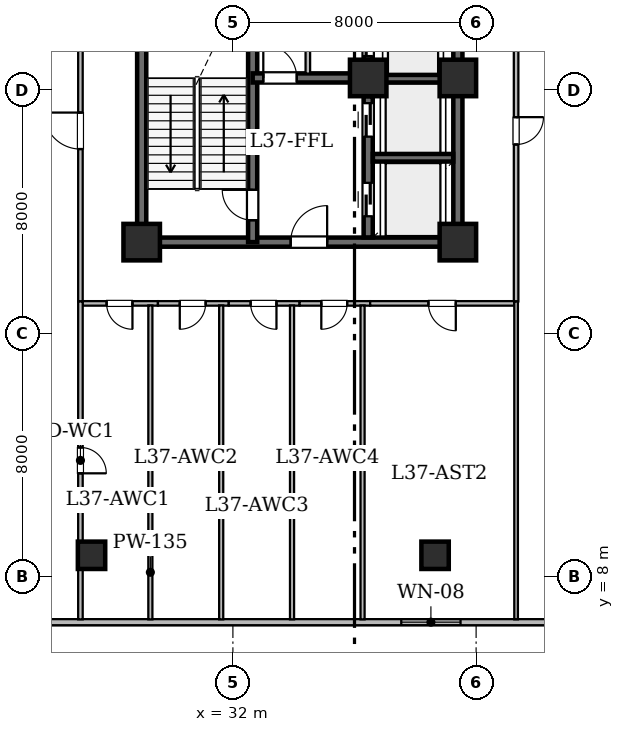
"""IFC4 building model, lengths in metres.
Left out: names, types, materials, properties, quantities, classifications, styles, units other than length and angle.
Written with IfcOpenShell. Run it as: python <this file> out.ifc"""

import sys

from ifc_helpers import new_model, si_unit, direction, frame, frame_2d, origin, origin_2d, place, context, subcontext, project, spatial, rectangle, hollow_rectangle, extrude, element, fill, save


model = new_model("IFC4")
c1 = context("Model", 3, precision=1e-05, world=origin(), true_north=direction((0.0, 1.0)))
c2 = subcontext(c1, "Body", "Model", "MODEL_VIEW")
j1 = project(units=[si_unit("LENGTHUNIT", "METRE"), si_unit("PLANEANGLEUNIT", "RADIAN")], contexts=[c1])
p1 = place(None, origin())
s1 = spatial("IfcSite", under=j1, at=p1, CompositionType="ELEMENT")
p2 = place(p1, origin())
s2 = spatial("IfcBuilding", under=s1, at=p2, CompositionType="ELEMENT")
p3 = place(p2, frame((0.0, 0.0, 145.7)))
s3 = spatial("IfcBuildingStorey", under=s2, at=p3, CompositionType="ELEMENT", Elevation=145.7)
for number, where, z_axis, x_axis in (
    (1, (29.0, 19.0, 0.0), (0.0, 0.0, 1.0), (1.0, 0.0, 0.0)),
    (2, (39.4, 19.0, 0.0), (0.0, 0.0, 1.0), (1.0, 0.0, 0.0)),
    (3, (36.45, 24.4, 0.0), (0.0, 0.0, 1.0), (1.0, 0.0, 0.0)),
    (4, (39.4, 24.4, 0.0), (0.0, 0.0, 1.0), (1.0, 0.0, 0.0)),
):
    element("IfcColumn", number, at=place(p3, frame(where, z_axis=z_axis, x_axis=x_axis)), inside=s3, PredefinedType="COLUMN", context=c2, shape_type="SweptSolid", body=[
        extrude(hollow_rectangle(XDim=1.2, YDim=1.2, WallThickness=0.06, at=origin_2d()), origin(), (0.0, 0.0, 1.0), 4.8),
    ])
for number, where, z_axis, x_axis in (
    (5, (27.35, 8.7, 0.0), (0.0, 0.0, 1.0), (1.0, 0.0, 0.0)),
    (6, (38.65, 8.7, 0.0), (0.0, 0.0, 1.0), (1.0, 0.0, 0.0)),
):
    element("IfcColumn", number, at=place(p3, frame(where, z_axis=z_axis, x_axis=x_axis)), inside=s3, PredefinedType="COLUMN", context=c2, shape_type="SweptSolid", body=[
        extrude(hollow_rectangle(XDim=0.9, YDim=0.9, WallThickness=0.045, at=origin_2d()), origin(), (0.0, 0.0, 1.0), 4.8),
    ])
p4 = place(p3, frame((52.296, 6.5, 0.0), z_axis=(0.0, 0.0, 1.0), x_axis=(-1.0, 0.0, 0.0)))
e7 = element("IfcWall", 7, at=p4, inside=s3, PredefinedType="STANDARD", context=c2, shape_type="SweptSolid", body=[
    extrude(rectangle(XDim=38.593, YDim=0.2, at=frame_2d((19.296, 0.0))), origin(), (0.0, 0.0, 1.0), 4.48),
])
p5 = place(p4, frame((12.808, 0.0, 0.9)))
e8 = element("IfcOpeningElement", 8, at=p5, cuts=e7, PredefinedType="OPENING", context=c2, shape_type="SweptSolid", body=[
    extrude(rectangle(XDim=1.95, YDim=1.65, at=frame_2d((0.975, 0.825))), frame((0.0, 0.11, 0.0), z_axis=(0.0, -1.0, 0.0), x_axis=(1.0, 0.0, 0.0)), (0.0, 0.0, 1.0), 0.22),
])
p6 = place(p3, frame((29.0, 19.0, 0.0), z_axis=(0.0, 0.0, 1.0), x_axis=(0.0, 1.0, 0.0)))
e9 = element("IfcWall", 9, at=p6, inside=s3, PredefinedType="SHEAR", context=c2, shape_type="SweptSolid", body=[
    extrude(rectangle(XDim=9.0, YDim=0.3, at=frame_2d((4.5, 0.0))), origin(), (0.0, 0.0, 1.0), 4.48),
])
p7 = place(p3, frame((29.0, 19.0, 0.0), z_axis=(0.0, 0.0, 1.0), x_axis=(1.0, 0.0, 0.0)))
e10 = element("IfcWall", 10, at=p7, inside=s3, PredefinedType="SHEAR", context=c2, shape_type="SweptSolid", body=[
    extrude(rectangle(XDim=10.4, YDim=0.3, at=frame_2d((5.2, 0.0))), origin(), (0.0, 0.0, 1.0), 4.48),
])
p8 = place(p7, frame((4.9, 0.0, 0.0)))
e11 = element("IfcOpeningElement", 11, at=p8, cuts=e10, PredefinedType="OPENING", context=c2, shape_type="SweptSolid", body=[
    extrude(rectangle(XDim=1.2, YDim=2.15, at=frame_2d((0.6, 1.075))), frame((0.0, 0.16, 0.0), z_axis=(0.0, -1.0, 0.0), x_axis=(1.0, 0.0, 0.0)), (0.0, 0.0, 1.0), 0.32),
])
p9 = place(p3, frame((39.4, 19.0, 0.0), z_axis=(0.0, 0.0, 1.0), x_axis=(0.0, 1.0, 0.0)))
e12 = element("IfcWall", 12, at=p9, inside=s3, PredefinedType="SHEAR", context=c2, shape_type="SweptSolid", body=[
    extrude(rectangle(XDim=5.4, YDim=0.3, at=frame_2d((2.7, 0.0))), origin(), (0.0, 0.0, 1.0), 4.48),
])
p10 = place(p3, frame((39.4, 24.4, 0.0), z_axis=(0.0, 0.0, 1.0), x_axis=(0.0, 1.0, 0.0)))
e13 = element("IfcWall", 13, at=p10, inside=s3, PredefinedType="SHEAR", context=c2, shape_type="SweptSolid", body=[
    extrude(rectangle(XDim=12.6, YDim=0.3, at=frame_2d((6.3, 0.0))), origin(), (0.0, 0.0, 1.0), 4.48),
])
p11 = place(p3, frame((32.65, 19.0, 0.0), z_axis=(0.0, 0.0, 1.0), x_axis=(0.0, 1.0, 0.0)))
e14 = element("IfcWall", 14, at=p11, inside=s3, PredefinedType="SHEAR", context=c2, shape_type="SweptSolid", body=[
    extrude(rectangle(XDim=9.0, YDim=0.3, at=frame_2d((4.5, 0.0))), origin(), (0.0, 0.0, 1.0), 4.48),
])
p12 = place(p11, frame((0.72, 0.0, 0.0)))
e15 = element("IfcOpeningElement", 15, at=p12, cuts=e14, PredefinedType="OPENING", context=c2, shape_type="SweptSolid", body=[
    extrude(rectangle(XDim=1.0, YDim=2.15, at=frame_2d((0.5, 1.075))), frame((0.0, 0.16, 0.0), z_axis=(0.0, -1.0, 0.0), x_axis=(1.0, 0.0, 0.0)), (0.0, 0.0, 1.0), 0.32),
])
p13 = place(p3, frame((32.65, 24.4, 0.0), z_axis=(0.0, 0.0, 1.0), x_axis=(1.0, 0.0, 0.0)))
e16 = element("IfcWall", 16, at=p13, inside=s3, PredefinedType="SHEAR", context=c2, shape_type="SweptSolid", body=[
    extrude(rectangle(XDim=3.8, YDim=0.3, at=frame_2d((1.9, 0.0))), origin(), (0.0, 0.0, 1.0), 4.48),
])
p14 = place(p13, frame((0.35, 0.0, 0.0)))
e17 = element("IfcOpeningElement", 17, at=p14, cuts=e16, PredefinedType="OPENING", context=c2, shape_type="SweptSolid", body=[
    extrude(rectangle(XDim=1.1, YDim=2.15, at=frame_2d((0.55, 1.075))), frame((0.0, 0.16, 0.0), z_axis=(0.0, -1.0, 0.0), x_axis=(1.0, 0.0, 0.0)), (0.0, 0.0, 1.0), 0.32),
])
p15 = place(p3, frame((36.45, 19.154, 0.0), z_axis=(0.0, 0.0, 1.0), x_axis=(0.0, 1.0, 0.0)))
e18 = element("IfcWall", 18, at=p15, inside=s3, PredefinedType="SHEAR", context=c2, shape_type="SweptSolid", body=[
    extrude(rectangle(XDim=4.646, YDim=0.3, at=frame_2d((2.323, 0.0))), origin(), (0.0, 0.0, 1.0), 4.48),
])
p16 = place(p15, frame((0.696, 0.0, 0.0)))
e19 = element("IfcOpeningElement", 19, at=p16, cuts=e18, PredefinedType="OPENING", context=c2, shape_type="SweptSolid", body=[
    extrude(rectangle(XDim=1.1, YDim=2.15, at=frame_2d((0.55, 1.075))), frame((0.0, 0.16, 0.0), z_axis=(0.0, -1.0, 0.0), x_axis=(1.0, 0.0, 0.0)), (0.0, 0.0, 1.0), 0.32),
])
p17 = place(p15, frame((3.316, 0.0, 0.0)))
e20 = element("IfcOpeningElement", 20, at=p17, cuts=e18, PredefinedType="OPENING", context=c2, shape_type="SweptSolid", body=[
    extrude(rectangle(XDim=1.1, YDim=2.15, at=frame_2d((0.55, 1.075))), frame((0.0, 0.16, 0.0), z_axis=(0.0, -1.0, 0.0), x_axis=(1.0, 0.0, 0.0)), (0.0, 0.0, 1.0), 0.32),
])
p18 = place(p3, frame((36.45, 25.0, 0.0), z_axis=(0.0, 0.0, 1.0), x_axis=(0.0, 1.0, 0.0)))
e21 = element("IfcWall", 21, at=p18, inside=s3, PredefinedType="SHEAR", context=c2, shape_type="SweptSolid", body=[
    extrude(rectangle(XDim=5.15, YDim=0.3, at=frame_2d((2.575, 0.0))), origin(), (0.0, 0.0, 1.0), 4.48),
])
p19 = place(p18, frame((0.12, 0.0, 0.0)))
e22 = element("IfcOpeningElement", 22, at=p19, cuts=e21, PredefinedType="OPENING", context=c2, shape_type="SweptSolid", body=[
    extrude(rectangle(XDim=1.05, YDim=2.15, at=frame_2d((0.525, 1.075))), frame((0.0, 0.16, 0.0), z_axis=(0.0, -1.0, 0.0), x_axis=(1.0, 0.0, 0.0)), (0.0, 0.0, 1.0), 0.32),
])
p20 = place(p18, frame((2.095, 0.0, 0.0)))
e23 = element("IfcOpeningElement", 23, at=p20, cuts=e21, PredefinedType="OPENING", context=c2, shape_type="SweptSolid", body=[
    extrude(rectangle(XDim=1.05, YDim=2.15, at=frame_2d((0.525, 1.075))), frame((0.0, 0.16, 0.0), z_axis=(0.0, -1.0, 0.0), x_axis=(1.0, 0.0, 0.0)), (0.0, 0.0, 1.0), 0.32),
])
p21 = place(p18, frame((3.98, 0.0, 0.0)))
e24 = element("IfcOpeningElement", 24, at=p21, cuts=e21, PredefinedType="OPENING", context=c2, shape_type="SweptSolid", body=[
    extrude(rectangle(XDim=1.05, YDim=2.15, at=frame_2d((0.525, 1.075))), frame((0.0, 0.16, 0.0), z_axis=(0.0, -1.0, 0.0), x_axis=(1.0, 0.0, 0.0)), (0.0, 0.0, 1.0), 0.32),
])
for number, where, z_axis, x_axis in (
    (25, (36.604, 21.775, 0.0), (0.0, 0.0, 1.0), (1.0, 0.0, 0.0)),
    (26, (36.604, 24.375, 0.0), (0.0, 0.0, 1.0), (1.0, 0.0, 0.0)),
):
    element("IfcWall", number, at=place(p3, frame(where, z_axis=z_axis, x_axis=x_axis)), inside=s3, PredefinedType="SHEAR", context=c2, shape_type="SweptSolid", body=[
        extrude(rectangle(XDim=2.642, YDim=0.25, at=frame_2d((1.321, 0.0))), origin(), (0.0, 0.0, 1.0), 4.48),
    ])
p22 = place(p3, frame((34.465, 27.55, 0.0), z_axis=(0.0, 0.0, 1.0), x_axis=(0.0, -1.0, 0.0)))
e27 = element("IfcWall", 27, at=p22, inside=s3, PredefinedType="STANDARD", context=c2, shape_type="SweptSolid", body=[
    extrude(rectangle(XDim=3.006, YDim=0.15, at=frame_2d((1.503, 0.0))), origin(), (0.0, 0.0, 1.0), 4.48),
])
p23 = place(p22, frame((1.053, 0.0, 0.0)))
e28 = element("IfcOpeningElement", 28, at=p23, cuts=e27, PredefinedType="OPENING", context=c2, shape_type="SweptSolid", body=[
    extrude(rectangle(XDim=0.9, YDim=2.1, at=frame_2d((0.45, 1.05))), frame((0.0, 0.085, 0.0), z_axis=(0.0, -1.0, 0.0), x_axis=(1.0, 0.0, 0.0)), (0.0, 0.0, 1.0), 0.17),
])
p24 = place(p3, frame((41.315, 28.314, 0.0), z_axis=(0.0, 0.0, 1.0), x_axis=(0.0, -1.0, 0.0)))
e29 = element("IfcWall", 29, at=p24, inside=s3, PredefinedType="STANDARD", context=c2, shape_type="SweptSolid", body=[
    extrude(rectangle(XDim=11.264, YDim=0.15, at=frame_2d((5.632, 0.0))), origin(), (0.0, 0.0, 1.0), 3.775),
])
p25 = place(p24, frame((5.203, 0.0, 0.0)))
e30 = element("IfcOpeningElement", 30, at=p25, cuts=e29, PredefinedType="OPENING", context=c2, shape_type="SweptSolid", body=[
    extrude(rectangle(XDim=0.9, YDim=2.1, at=frame_2d((0.45, 1.05))), frame((0.0, 0.085, 0.0), z_axis=(0.0, -1.0, 0.0), x_axis=(1.0, 0.0, 0.0)), (0.0, 0.0, 1.0), 0.17),
])
p26 = place(p3, frame((26.985, 17.05, 0.0), z_axis=(0.0, 0.0, 1.0), x_axis=(0.0, 1.0, 0.0)))
e31 = element("IfcWall", 31, at=p26, inside=s3, PredefinedType="STANDARD", context=c2, shape_type="SweptSolid", body=[
    extrude(rectangle(XDim=11.264, YDim=0.15, at=frame_2d((5.632, 0.0))), origin(), (0.0, 0.0, 1.0), 3.775),
])
p27 = place(p26, frame((5.011, 0.0, 0.0)))
e32 = element("IfcOpeningElement", 32, at=p27, cuts=e31, PredefinedType="OPENING", context=c2, shape_type="SweptSolid", body=[
    extrude(rectangle(XDim=1.2, YDim=2.15, at=frame_2d((0.6, 1.075))), frame((0.0, 0.085, 0.0), z_axis=(0.0, -1.0, 0.0), x_axis=(1.0, 0.0, 0.0)), (0.0, 0.0, 1.0), 0.17),
])
p28 = place(p3, frame((29.534, 16.985, 0.0), z_axis=(0.0, 0.0, 1.0), x_axis=(-1.0, 0.0, 0.0)))
e33 = element("IfcWall", 33, at=p28, inside=s3, PredefinedType="STANDARD", context=c2, shape_type="SweptSolid", body=[
    extrude(rectangle(XDim=2.484, YDim=0.15, at=frame_2d((1.242, 0.0))), origin(), (0.0, 0.0, 1.0), 3.775),
])
p29 = place(p28, frame((0.838, 0.0, 0.0)))
e34 = element("IfcOpeningElement", 34, at=p29, cuts=e33, PredefinedType="OPENING", context=c2, shape_type="SweptSolid", body=[
    extrude(rectangle(XDim=0.85, YDim=2.1, at=frame_2d((0.425, 1.05))), frame((0.0, 0.085, 0.0), z_axis=(0.0, -1.0, 0.0), x_axis=(1.0, 0.0, 0.0)), (0.0, 0.0, 1.0), 0.17),
])
p30 = place(p3, frame((31.864, 16.985, 0.0), z_axis=(0.0, 0.0, 1.0), x_axis=(-1.0, 0.0, 0.0)))
e35 = element("IfcWall", 35, at=p30, inside=s3, PredefinedType="STANDARD", context=c2, shape_type="SweptSolid", body=[
    extrude(rectangle(XDim=2.33, YDim=0.15, at=frame_2d((1.165, 0.0))), origin(), (0.0, 0.0, 1.0), 4.48),
])
p31 = place(p30, frame((0.761, 0.0, 0.0)))
e36 = element("IfcOpeningElement", 36, at=p31, cuts=e35, PredefinedType="OPENING", context=c2, shape_type="SweptSolid", body=[
    extrude(rectangle(XDim=0.85, YDim=2.1, at=frame_2d((0.425, 1.05))), frame((0.0, 0.085, 0.0), z_axis=(0.0, -1.0, 0.0), x_axis=(1.0, 0.0, 0.0)), (0.0, 0.0, 1.0), 0.17),
])
p32 = place(p3, frame((34.194, 16.985, 0.0), z_axis=(0.0, 0.0, 1.0), x_axis=(-1.0, 0.0, 0.0)))
e37 = element("IfcWall", 37, at=p32, inside=s3, PredefinedType="STANDARD", context=c2, shape_type="SweptSolid", body=[
    extrude(rectangle(XDim=2.33, YDim=0.15, at=frame_2d((1.165, 0.0))), origin(), (0.0, 0.0, 1.0), 4.48),
])
p33 = place(p32, frame((0.761, 0.0, 0.0)))
e38 = element("IfcOpeningElement", 38, at=p33, cuts=e37, PredefinedType="OPENING", context=c2, shape_type="SweptSolid", body=[
    extrude(rectangle(XDim=0.85, YDim=2.1, at=frame_2d((0.425, 1.05))), frame((0.0, 0.085, 0.0), z_axis=(0.0, -1.0, 0.0), x_axis=(1.0, 0.0, 0.0)), (0.0, 0.0, 1.0), 0.17),
])
p34 = place(p3, frame((36.514, 16.985, 0.0), z_axis=(0.0, 0.0, 1.0), x_axis=(-1.0, 0.0, 0.0)))
e39 = element("IfcWall", 39, at=p34, inside=s3, PredefinedType="STANDARD", context=c2, shape_type="SweptSolid", body=[
    extrude(rectangle(XDim=2.32, YDim=0.15, at=frame_2d((1.16, 0.0))), origin(), (0.0, 0.0, 1.0), 4.48),
])
p35 = place(p34, frame((0.756, 0.0, 0.0)))
e40 = element("IfcOpeningElement", 40, at=p35, cuts=e39, PredefinedType="OPENING", context=c2, shape_type="SweptSolid", body=[
    extrude(rectangle(XDim=0.85, YDim=2.1, at=frame_2d((0.425, 1.05))), frame((0.0, 0.085, 0.0), z_axis=(0.0, -1.0, 0.0), x_axis=(1.0, 0.0, 0.0)), (0.0, 0.0, 1.0), 0.17),
])
p36 = place(p3, frame((41.25, 16.985, 0.0), z_axis=(0.0, 0.0, 1.0), x_axis=(-1.0, 0.0, 0.0)))
e41 = element("IfcWall", 41, at=p36, inside=s3, PredefinedType="STANDARD", context=c2, shape_type="SweptSolid", body=[
    extrude(rectangle(XDim=4.736, YDim=0.15, at=frame_2d((2.368, 0.0))), origin(), (0.0, 0.0, 1.0), 3.775),
])
p37 = place(p36, frame((1.918, 0.0, 0.0)))
e42 = element("IfcOpeningElement", 42, at=p37, cuts=e41, PredefinedType="OPENING", context=c2, shape_type="SweptSolid", body=[
    extrude(rectangle(XDim=0.9, YDim=2.1, at=frame_2d((0.45, 1.05))), frame((0.0, 0.085, 0.0), z_axis=(0.0, -1.0, 0.0), x_axis=(1.0, 0.0, 0.0)), (0.0, 0.0, 1.0), 0.17),
])
p38 = place(p3, frame((41.315, 6.592, 0.0), z_axis=(0.0, 0.0, 1.0), x_axis=(0.0, 1.0, 0.0)))
e43 = element("IfcWall", 43, at=p38, inside=s3, PredefinedType="PARTITIONING", context=c2, shape_type="SweptSolid", body=[
    extrude(rectangle(XDim=10.458, YDim=0.12, at=frame_2d((5.229, 0.0))), origin(), (0.0, 0.0, 1.0), 3.926),
])
p39 = place(p3, frame((26.985, 17.05, 0.0), z_axis=(0.0, 0.0, 1.0), x_axis=(0.0, -1.0, 0.0)))
e44 = element("IfcWall", 44, at=p39, inside=s3, PredefinedType="STANDARD", context=c2, shape_type="SweptSolid", body=[
    extrude(rectangle(XDim=10.458, YDim=0.15, at=frame_2d((5.229, 0.0))), origin(), (0.0, 0.0, 1.0), 3.775),
])
p40 = place(p39, frame((4.804, 0.0, 0.0)))
e45 = element("IfcOpeningElement", 45, at=p40, cuts=e44, PredefinedType="OPENING", context=c2, shape_type="SweptSolid", body=[
    extrude(rectangle(XDim=0.85, YDim=2.1, at=frame_2d((0.425, 1.05))), frame((0.0, 0.085, 0.0), z_axis=(0.0, -1.0, 0.0), x_axis=(1.0, 0.0, 0.0)), (0.0, 0.0, 1.0), 0.17),
])
for number, where, z_axis, x_axis in (
    (46, (29.285, 16.918, 0.0), (0.0, 0.0, 1.0), (0.0, -1.0, 0.0)),
    (47, (31.615, 16.918, 0.0), (0.0, 0.0, 1.0), (0.0, -1.0, 0.0)),
    (48, (33.945, 16.918, 0.0), (0.0, 0.0, 1.0), (0.0, -1.0, 0.0)),
    (49, (36.265, 16.918, 0.0), (0.0, 0.0, 1.0), (0.0, -1.0, 0.0)),
):
    element("IfcWall", number, at=place(p3, frame(where, z_axis=z_axis, x_axis=x_axis)), inside=s3, PredefinedType="PARTITIONING", context=c2, shape_type="SweptSolid", body=[
        extrude(rectangle(XDim=10.326, YDim=0.135, at=frame_2d((5.163, 0.0))), origin(), (0.0, 0.0, 1.0), 3.926),
    ])
p41 = place(p5, origin())
e50 = element("IfcWindow", 50, at=p41, inside=s3, PartitioningType="SINGLE_PANEL", PredefinedType="WINDOW", context=c2, shape_type="SweptSolid", body=[
    extrude(rectangle(XDim=1.95, YDim=1.65, at=frame_2d((0.975, 0.825))), frame((0.0, 0.03, 0.0), z_axis=(0.0, -1.0, 0.0), x_axis=(1.0, 0.0, 0.0)), (0.0, 0.0, 1.0), 0.06),
])
fill(e8, e50)
p42 = place(p12, origin())
e51 = element("IfcDoor", 51, at=p42, inside=s3, OperationType="SINGLE_SWING_RIGHT", PredefinedType="DOOR", context=c2, shape_type="SweptSolid", body=[
    extrude(rectangle(XDim=1.0, YDim=2.15, at=frame_2d((0.5, 1.075))), frame((0.0, 0.025, 0.0), z_axis=(0.0, -1.0, 0.0), x_axis=(1.0, 0.0, 0.0)), (0.0, 0.0, 1.0), 0.05),
])
fill(e15, e51)
p43 = place(p14, origin())
e52 = element("IfcDoor", 52, at=p43, inside=s3, OperationType="SINGLE_SWING_LEFT", PredefinedType="DOOR", context=c2, shape_type="SweptSolid", body=[
    extrude(rectangle(XDim=1.1, YDim=2.15, at=frame_2d((0.55, 1.075))), frame((0.0, 0.025, 0.0), z_axis=(0.0, -1.0, 0.0), x_axis=(1.0, 0.0, 0.0)), (0.0, 0.0, 1.0), 0.05),
])
fill(e17, e52)
p44 = place(p8, origin())
e53 = element("IfcDoor", 53, at=p44, inside=s3, OperationType="SINGLE_SWING_RIGHT", PredefinedType="DOOR", context=c2, shape_type="SweptSolid", body=[
    extrude(rectangle(XDim=1.2, YDim=2.15, at=frame_2d((0.6, 1.075))), frame((0.0, 0.025, 0.0), z_axis=(0.0, -1.0, 0.0), x_axis=(1.0, 0.0, 0.0)), (0.0, 0.0, 1.0), 0.05),
])
fill(e11, e53)
p45 = place(p16, origin())
e54 = element("IfcDoor", 54, at=p45, inside=s3, OperationType="SLIDING_TO_LEFT", PredefinedType="DOOR", context=c2, shape_type="SweptSolid", body=[
    extrude(rectangle(XDim=1.1, YDim=2.15, at=frame_2d((0.55, 1.075))), frame((0.0, 0.025, 0.0), z_axis=(0.0, -1.0, 0.0), x_axis=(1.0, 0.0, 0.0)), (0.0, 0.0, 1.0), 0.05),
])
fill(e19, e54)
p46 = place(p17, origin())
e55 = element("IfcDoor", 55, at=p46, inside=s3, OperationType="SLIDING_TO_LEFT", PredefinedType="DOOR", context=c2, shape_type="SweptSolid", body=[
    extrude(rectangle(XDim=1.1, YDim=2.15, at=frame_2d((0.55, 1.075))), frame((0.0, 0.025, 0.0), z_axis=(0.0, -1.0, 0.0), x_axis=(1.0, 0.0, 0.0)), (0.0, 0.0, 1.0), 0.05),
])
fill(e20, e55)
p47 = place(p19, origin())
e56 = element("IfcDoor", 56, at=p47, inside=s3, OperationType="SLIDING_TO_LEFT", PredefinedType="DOOR", context=c2, shape_type="SweptSolid", body=[
    extrude(rectangle(XDim=1.05, YDim=2.15, at=frame_2d((0.525, 1.075))), frame((0.0, 0.025, 0.0), z_axis=(0.0, -1.0, 0.0), x_axis=(1.0, 0.0, 0.0)), (0.0, 0.0, 1.0), 0.05),
])
fill(e22, e56)
p48 = place(p25, origin())
e57 = element("IfcDoor", 57, at=p48, inside=s3, OperationType="SINGLE_SWING_LEFT", PredefinedType="DOOR", context=c2, shape_type="SweptSolid", body=[
    extrude(rectangle(XDim=0.9, YDim=2.1, at=frame_2d((0.45, 1.05))), frame((0.0, 0.025, 0.0), z_axis=(0.0, -1.0, 0.0), x_axis=(1.0, 0.0, 0.0)), (0.0, 0.0, 1.0), 0.05),
])
fill(e30, e57)
p49 = place(p27, origin())
e58 = element("IfcDoor", 58, at=p49, inside=s3, OperationType="SINGLE_SWING_RIGHT", PredefinedType="DOOR", context=c2, shape_type="SweptSolid", body=[
    extrude(rectangle(XDim=1.2, YDim=2.15, at=frame_2d((0.6, 1.075))), frame((0.0, 0.025, 0.0), z_axis=(0.0, -1.0, 0.0), x_axis=(1.0, 0.0, 0.0)), (0.0, 0.0, 1.0), 0.05),
])
fill(e32, e58)
p50 = place(p29, origin())
e59 = element("IfcDoor", 59, at=p50, inside=s3, OperationType="SINGLE_SWING_LEFT", PredefinedType="DOOR", context=c2, shape_type="SweptSolid", body=[
    extrude(rectangle(XDim=0.85, YDim=2.1, at=frame_2d((0.425, 1.05))), frame((0.0, 0.025, 0.0), z_axis=(0.0, -1.0, 0.0), x_axis=(1.0, 0.0, 0.0)), (0.0, 0.0, 1.0), 0.05),
])
fill(e34, e59)
p51 = place(p31, origin())
e60 = element("IfcDoor", 60, at=p51, inside=s3, OperationType="SINGLE_SWING_RIGHT", PredefinedType="DOOR", context=c2, shape_type="SweptSolid", body=[
    extrude(rectangle(XDim=0.85, YDim=2.1, at=frame_2d((0.425, 1.05))), frame((0.0, 0.025, 0.0), z_axis=(0.0, -1.0, 0.0), x_axis=(1.0, 0.0, 0.0)), (0.0, 0.0, 1.0), 0.05),
])
fill(e36, e60)
p52 = place(p33, origin())
e61 = element("IfcDoor", 61, at=p52, inside=s3, OperationType="SINGLE_SWING_LEFT", PredefinedType="DOOR", context=c2, shape_type="SweptSolid", body=[
    extrude(rectangle(XDim=0.85, YDim=2.1, at=frame_2d((0.425, 1.05))), frame((0.0, 0.025, 0.0), z_axis=(0.0, -1.0, 0.0), x_axis=(1.0, 0.0, 0.0)), (0.0, 0.0, 1.0), 0.05),
])
fill(e38, e61)
p53 = place(p35, origin())
e62 = element("IfcDoor", 62, at=p53, inside=s3, OperationType="SINGLE_SWING_RIGHT", PredefinedType="DOOR", context=c2, shape_type="SweptSolid", body=[
    extrude(rectangle(XDim=0.85, YDim=2.1, at=frame_2d((0.425, 1.05))), frame((0.0, 0.025, 0.0), z_axis=(0.0, -1.0, 0.0), x_axis=(1.0, 0.0, 0.0)), (0.0, 0.0, 1.0), 0.05),
])
fill(e40, e62)
p54 = place(p37, origin())
e63 = element("IfcDoor", 63, at=p54, inside=s3, OperationType="SINGLE_SWING_LEFT", PredefinedType="DOOR", context=c2, shape_type="SweptSolid", body=[
    extrude(rectangle(XDim=0.9, YDim=2.1, at=frame_2d((0.45, 1.05))), frame((0.0, 0.025, 0.0), z_axis=(0.0, -1.0, 0.0), x_axis=(1.0, 0.0, 0.0)), (0.0, 0.0, 1.0), 0.05),
])
fill(e42, e63)
p55 = place(p40, origin())
e64 = element("IfcDoor", 64, at=p55, inside=s3, OperationType="SINGLE_SWING_RIGHT", PredefinedType="DOOR", context=c2, shape_type="SweptSolid", body=[
    extrude(rectangle(XDim=0.85, YDim=2.1, at=frame_2d((0.425, 1.05))), frame((0.0, 0.025, 0.0), z_axis=(0.0, -1.0, 0.0), x_axis=(1.0, 0.0, 0.0)), (0.0, 0.0, 1.0), 0.05),
])
fill(e45, e64)
save(model, sys.argv[1])
